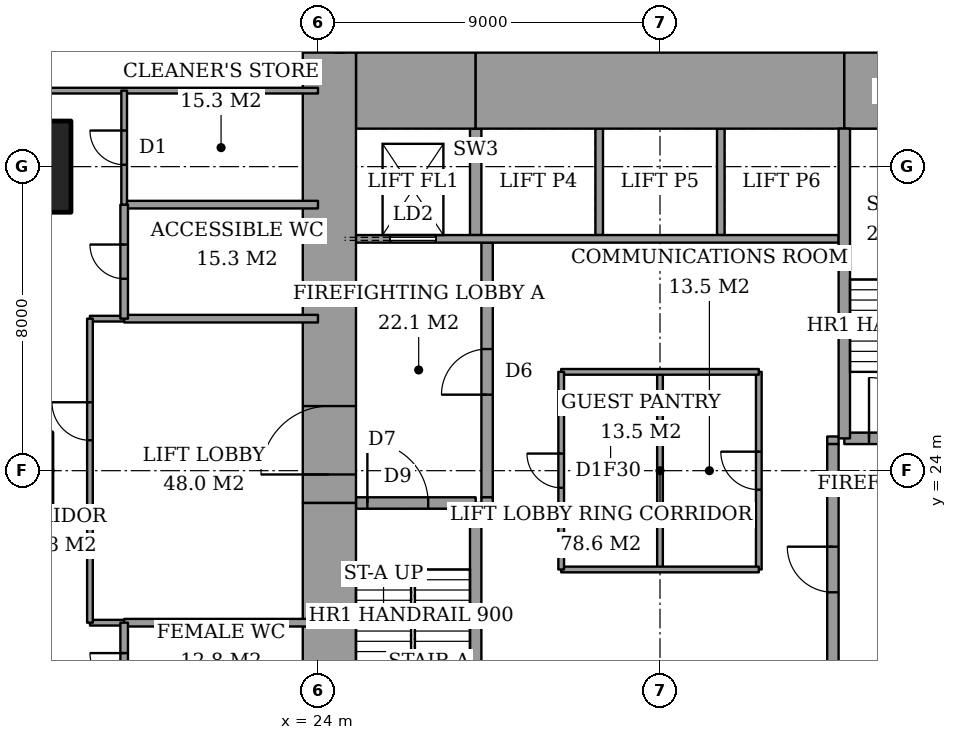
"""IFC4 building model, lengths in metres.
Left out: names, types, materials, properties, quantities, classifications, styles, units other than length and angle.
Written with IfcOpenShell. Run it as: python <this file> out.ifc"""

import sys

from ifc_helpers import new_model, si_unit, direction, frame, frame_2d, origin, origin_2d, place, context, subcontext, project, spatial, rectangle, extrude, element, fill, save


model = new_model("IFC4")
c1 = context("Model", 3, precision=1e-05, world=origin(), true_north=direction((0.0, 1.0)))
c2 = subcontext(c1, "Body", "Model", "MODEL_VIEW")
j1 = project(units=[si_unit("LENGTHUNIT", "METRE"), si_unit("PLANEANGLEUNIT", "RADIAN")], contexts=[c1])
p1 = place(None, origin())
s1 = spatial("IfcSite", under=j1, at=p1, CompositionType="ELEMENT")
p2 = place(p1, origin())
s2 = spatial("IfcBuilding", under=s1, at=p2, CompositionType="ELEMENT")
p3 = place(p2, frame((0.0, 0.0, 26.0)))
s3 = spatial("IfcBuildingStorey", under=s2, at=p3, CompositionType="ELEMENT", Elevation=26.0)
p4 = place(p3, frame((16.0, 32.0, 0.0), z_axis=(0.0, 0.0, 1.0), x_axis=(1.0, 0.0, 0.0)))
e1 = element("IfcColumn", 1, at=p4, inside=s3, PredefinedType="COLUMN", context=c2, shape_type="SweptSolid", body=[
    extrude(rectangle(XDim=3.0, YDim=2.4, at=origin_2d()), origin(), (0.0, 0.0, 1.0), 3.6),
])
p5 = place(p3, frame((25.0, 34.0, 0.0), z_axis=(0.0, 0.0, 1.0), x_axis=(1.0, 0.0, 0.0)))
e2 = element("IfcWall", 2, at=p5, inside=s3, PredefinedType="SHEAR", context=c2, shape_type="SweptSolid", body=[
    extrude(rectangle(XDim=3.15, YDim=2.0, at=frame_2d((1.575, 0.0))), origin(), (0.0, 0.0, 1.0), 3.6),
])
p6 = place(p3, frame((28.15, 34.0, 0.0), z_axis=(0.0, 0.0, 1.0), x_axis=(1.0, 0.0, 0.0)))
e3 = element("IfcWall", 3, at=p6, inside=s3, PredefinedType="SHEAR", context=c2, shape_type="SweptSolid", body=[
    extrude(rectangle(XDim=9.7, YDim=2.0, at=frame_2d((4.85, 0.0))), origin(), (0.0, 0.0, 1.0), 3.6),
])
p7 = place(p3, frame((37.85, 34.0, 0.0), z_axis=(0.0, 0.0, 1.0), x_axis=(1.0, 0.0, 0.0)))
e4 = element("IfcWall", 4, at=p7, inside=s3, PredefinedType="SHEAR", context=c2, shape_type="SweptSolid", body=[
    extrude(rectangle(XDim=3.15, YDim=2.0, at=frame_2d((1.575, 0.0))), origin(), (0.0, 0.0, 1.0), 3.6),
])
p8 = place(p3, frame((24.3, 13.0, 0.0), z_axis=(0.0, 0.0, 1.0), x_axis=(0.0, 1.0, 0.0)))
e5 = element("IfcWall", 5, at=p8, inside=s3, PredefinedType="SHEAR", context=c2, shape_type="SweptSolid", body=[
    extrude(rectangle(XDim=10.15, YDim=1.4, at=frame_2d((5.075, 0.0))), origin(), (0.0, 0.0, 1.0), 3.6),
])
p9 = place(p3, frame((24.3, 23.15, 0.0), z_axis=(0.0, 0.0, 1.0), x_axis=(0.0, 1.0, 0.0)))
e6 = element("IfcWall", 6, at=p9, inside=s3, PredefinedType="SHEAR", context=c2, shape_type="SweptSolid", body=[
    extrude(rectangle(XDim=11.85, YDim=1.4, at=frame_2d((5.925, 0.0))), origin(), (0.0, 0.0, 1.0), 3.6),
])
p10 = place(p9, frame((0.75, 0.0, 0.0)))
e7 = element("IfcOpeningElement", 7, at=p10, cuts=e6, PredefinedType="OPENING", context=c2, shape_type="SweptSolid", body=[
    extrude(rectangle(XDim=1.8, YDim=2.4, at=frame_2d((0.9, 1.2))), frame((0.0, 0.71, 0.0), z_axis=(0.0, -1.0, 0.0), x_axis=(1.0, 0.0, 0.0)), (0.0, 0.0, 1.0), 1.42),
])
p11 = place(p3, frame((28.15, 15.0, 0.0), z_axis=(0.0, 0.0, 1.0), x_axis=(0.0, 1.0, 0.0)))
e8 = element("IfcWall", 8, at=p11, inside=s3, PredefinedType="SHEAR", context=c2, shape_type="SweptSolid", body=[
    extrude(rectangle(XDim=8.15, YDim=0.3, at=frame_2d((4.075, 0.0))), origin(), (0.0, 0.0, 1.0), 3.6),
])
p12 = place(p3, frame((25.0, 23.15, 0.0), z_axis=(0.0, 0.0, 1.0), x_axis=(1.0, 0.0, 0.0)))
e9 = element("IfcWall", 9, at=p12, inside=s3, PredefinedType="SHEAR", context=c2, shape_type="SweptSolid", body=[
    extrude(rectangle(XDim=3.15, YDim=0.3, at=frame_2d((1.575, 0.0))), origin(), (0.0, 0.0, 1.0), 3.6),
])
p13 = place(p12, frame((0.3, 0.0, 0.0)))
e10 = element("IfcOpeningElement", 10, at=p13, cuts=e9, PredefinedType="OPENING", context=c2, shape_type="SweptSolid", body=[
    extrude(rectangle(XDim=1.6, YDim=2.1, at=frame_2d((0.8, 1.05))), frame((0.0, 0.16, 0.0), z_axis=(0.0, -1.0, 0.0), x_axis=(1.0, 0.0, 0.0)), (0.0, 0.0, 1.0), 0.32),
])
p14 = place(p3, frame((37.85, 24.85, 0.0), z_axis=(0.0, 0.0, 1.0), x_axis=(0.0, 1.0, 0.0)))
e11 = element("IfcWall", 11, at=p14, inside=s3, PredefinedType="SHEAR", context=c2, shape_type="SweptSolid", body=[
    extrude(rectangle(XDim=8.15, YDim=0.3, at=frame_2d((4.075, 0.0))), origin(), (0.0, 0.0, 1.0), 3.6),
])
p15 = place(p3, frame((37.85, 24.85, 0.0), z_axis=(0.0, 0.0, 1.0), x_axis=(1.0, 0.0, 0.0)))
e12 = element("IfcWall", 12, at=p15, inside=s3, PredefinedType="SHEAR", context=c2, shape_type="SweptSolid", body=[
    extrude(rectangle(XDim=3.15, YDim=0.3, at=frame_2d((1.575, 0.0))), origin(), (0.0, 0.0, 1.0), 3.6),
])
p16 = place(p15, frame((0.65, 0.0, 0.0)))
e13 = element("IfcOpeningElement", 13, at=p16, cuts=e12, PredefinedType="OPENING", context=c2, shape_type="SweptSolid", body=[
    extrude(rectangle(XDim=1.6, YDim=2.1, at=frame_2d((0.8, 1.05))), frame((0.0, 0.16, 0.0), z_axis=(0.0, -1.0, 0.0), x_axis=(1.0, 0.0, 0.0)), (0.0, 0.0, 1.0), 0.32),
])
p17 = place(p3, frame((28.45, 23.3, 0.0), z_axis=(0.0, 0.0, 1.0), x_axis=(0.0, 1.0, 0.0)))
e14 = element("IfcWall", 14, at=p17, inside=s3, PredefinedType="PARTITIONING", context=c2, shape_type="SweptSolid", body=[
    extrude(rectangle(XDim=6.7, YDim=0.3, at=frame_2d((3.35, 0.0))), origin(), (0.0, 0.0, 1.0), 3.6),
])
p18 = place(p17, frame((2.7, 0.0, 0.0)))
e15 = element("IfcOpeningElement", 15, at=p18, cuts=e14, PredefinedType="OPENING", context=c2, shape_type="SweptSolid", body=[
    extrude(rectangle(XDim=1.2, YDim=2.1, at=frame_2d((0.6, 1.05))), frame((0.0, 0.16, 0.0), z_axis=(0.0, -1.0, 0.0), x_axis=(1.0, 0.0, 0.0)), (0.0, 0.0, 1.0), 0.32),
])
p19 = place(p3, frame((37.55, 18.0, 0.0), z_axis=(0.0, 0.0, 1.0), x_axis=(0.0, 1.0, 0.0)))
e16 = element("IfcWall", 16, at=p19, inside=s3, PredefinedType="PARTITIONING", context=c2, shape_type="SweptSolid", body=[
    extrude(rectangle(XDim=6.7, YDim=0.3, at=frame_2d((3.35, 0.0))), origin(), (0.0, 0.0, 1.0), 3.6),
])
p20 = place(p19, frame((2.8, 0.0, 0.0)))
e17 = element("IfcOpeningElement", 17, at=p20, cuts=e16, PredefinedType="OPENING", context=c2, shape_type="SweptSolid", body=[
    extrude(rectangle(XDim=1.2, YDim=2.1, at=frame_2d((0.6, 1.05))), frame((0.0, 0.16, 0.0), z_axis=(0.0, -1.0, 0.0), x_axis=(1.0, 0.0, 0.0)), (0.0, 0.0, 1.0), 0.32),
])
p21 = place(p3, frame((18.9, 20.0, 0.0), z_axis=(0.0, 0.0, 1.0), x_axis=(1.0, 0.0, 0.0)))
e18 = element("IfcWall", 18, at=p21, inside=s3, PredefinedType="PARTITIONING", context=c2, shape_type="SweptSolid", body=[
    extrude(rectangle(XDim=5.1, YDim=0.2, at=frame_2d((2.55, 0.0))), origin(), (0.0, 0.0, 1.0), 3.35),
])
p22 = place(p3, frame((18.0, 20.0, 0.0), z_axis=(0.0, 0.0, 1.0), x_axis=(1.0, 0.0, 0.0)))
e19 = element("IfcWall", 19, at=p22, inside=s3, PredefinedType="PARTITIONING", context=c2, shape_type="SweptSolid", body=[
    extrude(rectangle(XDim=0.9, YDim=0.15, at=frame_2d((0.45, 0.0))), origin(), (0.0, 0.0, 1.0), 3.35),
])
p23 = place(p3, frame((18.9, 28.0, 0.0), z_axis=(0.0, 0.0, 1.0), x_axis=(1.0, 0.0, 0.0)))
e20 = element("IfcWall", 20, at=p23, inside=s3, PredefinedType="PARTITIONING", context=c2, shape_type="SweptSolid", body=[
    extrude(rectangle(XDim=5.1, YDim=0.2, at=frame_2d((2.55, 0.0))), origin(), (0.0, 0.0, 1.0), 3.35),
])
p24 = place(p3, frame((18.0, 28.0, 0.0), z_axis=(0.0, 0.0, 1.0), x_axis=(1.0, 0.0, 0.0)))
e21 = element("IfcWall", 21, at=p24, inside=s3, PredefinedType="PARTITIONING", context=c2, shape_type="SweptSolid", body=[
    extrude(rectangle(XDim=0.9, YDim=0.15, at=frame_2d((0.45, 0.0))), origin(), (0.0, 0.0, 1.0), 3.35),
])
p25 = place(p3, frame((18.9, 31.0, 0.0), z_axis=(0.0, 0.0, 1.0), x_axis=(1.0, 0.0, 0.0)))
e22 = element("IfcWall", 22, at=p25, inside=s3, PredefinedType="PARTITIONING", context=c2, shape_type="SweptSolid", body=[
    extrude(rectangle(XDim=5.1, YDim=0.2, at=frame_2d((2.55, 0.0))), origin(), (0.0, 0.0, 1.0), 3.35),
])
p26 = place(p3, frame((12.0, 34.0, 0.0), z_axis=(0.0, 0.0, 1.0), x_axis=(1.0, 0.0, 0.0)))
e23 = element("IfcWall", 23, at=p26, inside=s3, PredefinedType="PARTITIONING", context=c2, shape_type="SweptSolid", body=[
    extrude(rectangle(XDim=12.0, YDim=0.15, at=frame_2d((6.0, 0.0))), origin(), (0.0, 0.0, 1.0), 3.35),
])
p27 = place(p26, frame((0.65, 0.0, 0.0)))
e24 = element("IfcOpeningElement", 24, at=p27, cuts=e23, PredefinedType="OPENING", context=c2, shape_type="SweptSolid", body=[
    extrude(rectangle(XDim=1.8, YDim=2.1, at=frame_2d((0.9, 1.05))), frame((0.0, 0.085, 0.0), z_axis=(0.0, -1.0, 0.0), x_axis=(1.0, 0.0, 0.0)), (0.0, 0.0, 1.0), 0.17),
])
p28 = place(p3, frame((18.0, 20.0, 0.0), z_axis=(0.0, 0.0, 1.0), x_axis=(0.0, 1.0, 0.0)))
e25 = element("IfcWall", 25, at=p28, inside=s3, PredefinedType="PARTITIONING", context=c2, shape_type="SweptSolid", body=[
    extrude(rectangle(XDim=8.0, YDim=0.15, at=frame_2d((4.0, 0.0))), origin(), (0.0, 0.0, 1.0), 3.35),
])
p29 = place(p28, frame((4.8, 0.0, 0.0)))
e26 = element("IfcOpeningElement", 26, at=p29, cuts=e25, PredefinedType="OPENING", context=c2, shape_type="SweptSolid", body=[
    extrude(rectangle(XDim=1.0, YDim=2.1, at=frame_2d((0.5, 1.05))), frame((0.0, 0.085, 0.0), z_axis=(0.0, -1.0, 0.0), x_axis=(1.0, 0.0, 0.0)), (0.0, 0.0, 1.0), 0.17),
])
p30 = place(p3, frame((18.9, 14.0, 0.0), z_axis=(0.0, 0.0, 1.0), x_axis=(0.0, 1.0, 0.0)))
e27 = element("IfcWall", 27, at=p30, inside=s3, PredefinedType="PARTITIONING", context=c2, shape_type="SweptSolid", body=[
    extrude(rectangle(XDim=6.0, YDim=0.2, at=frame_2d((3.0, 0.0))), origin(), (0.0, 0.0, 1.0), 3.35),
])
p31 = place(p30, frame((1.3, 0.0, 0.0)))
e28 = element("IfcOpeningElement", 28, at=p31, cuts=e27, PredefinedType="OPENING", context=c2, shape_type="SweptSolid", body=[
    extrude(rectangle(XDim=0.9, YDim=2.1, at=frame_2d((0.45, 1.05))), frame((0.0, 0.11, 0.0), z_axis=(0.0, -1.0, 0.0), x_axis=(1.0, 0.0, 0.0)), (0.0, 0.0, 1.0), 0.22),
])
p32 = place(p30, frame((4.3, 0.0, 0.0)))
e29 = element("IfcOpeningElement", 29, at=p32, cuts=e27, PredefinedType="OPENING", context=c2, shape_type="SweptSolid", body=[
    extrude(rectangle(XDim=0.9, YDim=2.1, at=frame_2d((0.45, 1.05))), frame((0.0, 0.11, 0.0), z_axis=(0.0, -1.0, 0.0), x_axis=(1.0, 0.0, 0.0)), (0.0, 0.0, 1.0), 0.22),
])
p33 = place(p3, frame((18.9, 28.0, 0.0), z_axis=(0.0, 0.0, 1.0), x_axis=(0.0, 1.0, 0.0)))
e30 = element("IfcWall", 30, at=p33, inside=s3, PredefinedType="PARTITIONING", context=c2, shape_type="SweptSolid", body=[
    extrude(rectangle(XDim=3.0, YDim=0.2, at=frame_2d((1.5, 0.0))), origin(), (0.0, 0.0, 1.0), 3.35),
])
p34 = place(p33, frame((1.05, 0.0, 0.0)))
e31 = element("IfcOpeningElement", 31, at=p34, cuts=e30, PredefinedType="OPENING", context=c2, shape_type="SweptSolid", body=[
    extrude(rectangle(XDim=0.9, YDim=2.1, at=frame_2d((0.45, 1.05))), frame((0.0, 0.11, 0.0), z_axis=(0.0, -1.0, 0.0), x_axis=(1.0, 0.0, 0.0)), (0.0, 0.0, 1.0), 0.22),
])
p35 = place(p3, frame((18.9, 31.0, 0.0), z_axis=(0.0, 0.0, 1.0), x_axis=(0.0, 1.0, 0.0)))
e32 = element("IfcWall", 32, at=p35, inside=s3, PredefinedType="PARTITIONING", context=c2, shape_type="SweptSolid", body=[
    extrude(rectangle(XDim=3.0, YDim=0.15, at=frame_2d((1.5, 0.0))), origin(), (0.0, 0.0, 1.0), 3.35),
])
p36 = place(p35, frame((1.05, 0.0, 0.0)))
e33 = element("IfcOpeningElement", 33, at=p36, cuts=e32, PredefinedType="OPENING", context=c2, shape_type="SweptSolid", body=[
    extrude(rectangle(XDim=0.9, YDim=2.1, at=frame_2d((0.45, 1.05))), frame((0.0, 0.085, 0.0), z_axis=(0.0, -1.0, 0.0), x_axis=(1.0, 0.0, 0.0)), (0.0, 0.0, 1.0), 0.17),
])
p37 = place(p3, frame((25.0, 30.1, 0.0), z_axis=(0.0, 0.0, 1.0), x_axis=(1.0, 0.0, 0.0)))
e34 = element("IfcWall", 34, at=p37, inside=s3, PredefinedType="PARTITIONING", context=c2, shape_type="SweptSolid", body=[
    extrude(rectangle(XDim=12.7, YDim=0.2, at=frame_2d((6.35, 0.0))), origin(), (0.0, 0.0, 1.0), 3.6),
])
p38 = place(p37, frame((0.9, 0.0, 0.0)))
e35 = element("IfcOpeningElement", 35, at=p38, cuts=e34, PredefinedType="OPENING", context=c2, shape_type="SweptSolid", body=[
    extrude(rectangle(XDim=1.2, YDim=2.1, at=frame_2d((0.6, 1.05))), frame((0.0, 0.11, 0.0), z_axis=(0.0, -1.0, 0.0), x_axis=(1.0, 0.0, 0.0)), (0.0, 0.0, 1.0), 0.22),
])
for number, where, z_axis, x_axis in (
    (36, (31.4, 30.2, 0.0), (0.0, 0.0, 1.0), (0.0, 1.0, 0.0)),
    (37, (34.6, 30.2, 0.0), (0.0, 0.0, 1.0), (0.0, 1.0, 0.0)),
):
    element("IfcWall", number, at=place(p3, frame(where, z_axis=z_axis, x_axis=x_axis)), inside=s3, PredefinedType="PARTITIONING", context=c2, shape_type="SweptSolid", body=[
        extrude(rectangle(XDim=2.8, YDim=0.2, at=frame_2d((1.4, 0.0))), origin(), (0.0, 0.0, 1.0), 3.6),
    ])
p39 = place(p3, frame((28.15, 30.2, 0.0), z_axis=(0.0, 0.0, 1.0), x_axis=(0.0, 1.0, 0.0)))
e38 = element("IfcWall", 38, at=p39, inside=s3, PredefinedType="SHEAR", context=c2, shape_type="SweptSolid", body=[
    extrude(rectangle(XDim=2.8, YDim=0.3, at=frame_2d((1.4, 0.0))), origin(), (0.0, 0.0, 1.0), 3.6),
])
for number, where, z_axis, x_axis in (
    (39, (28.3, 23.2, 0.0), (0.0, 0.0, 1.0), (1.0, 0.0, 0.0)),
    (40, (37.4, 24.8, 0.0), (0.0, 0.0, 1.0), (1.0, 0.0, 0.0)),
):
    element("IfcWall", number, at=place(p3, frame(where, z_axis=z_axis, x_axis=x_axis)), inside=s3, PredefinedType="PARTITIONING", context=c2, shape_type="SweptSolid", body=[
        extrude(rectangle(XDim=0.3, YDim=0.2, at=frame_2d((0.15, 0.0))), origin(), (0.0, 0.0, 1.0), 3.6),
    ])
for number, where, z_axis, x_axis in (
    (41, (30.4, 21.4, 0.0), (0.0, 0.0, 1.0), (1.0, 0.0, 0.0)),
    (42, (30.4, 26.6, 0.0), (0.0, 0.0, 1.0), (1.0, 0.0, 0.0)),
):
    element("IfcWall", number, at=place(p3, frame(where, z_axis=z_axis, x_axis=x_axis)), inside=s3, PredefinedType="PARTITIONING", context=c2, shape_type="SweptSolid", body=[
        extrude(rectangle(XDim=5.2, YDim=0.15, at=frame_2d((2.6, 0.0))), origin(), (0.0, 0.0, 1.0), 3.35),
    ])
p40 = place(p3, frame((30.4, 21.4, 0.0), z_axis=(0.0, 0.0, 1.0), x_axis=(0.0, 1.0, 0.0)))
e43 = element("IfcWall", 43, at=p40, inside=s3, PredefinedType="PARTITIONING", context=c2, shape_type="SweptSolid", body=[
    extrude(rectangle(XDim=5.2, YDim=0.15, at=frame_2d((2.6, 0.0))), origin(), (0.0, 0.0, 1.0), 3.35),
])
p41 = place(p40, frame((2.15, 0.0, 0.0)))
e44 = element("IfcOpeningElement", 44, at=p41, cuts=e43, PredefinedType="OPENING", context=c2, shape_type="SweptSolid", body=[
    extrude(rectangle(XDim=0.9, YDim=2.1, at=frame_2d((0.45, 1.05))), frame((0.0, 0.085, 0.0), z_axis=(0.0, -1.0, 0.0), x_axis=(1.0, 0.0, 0.0)), (0.0, 0.0, 1.0), 0.17),
])
p42 = place(p3, frame((35.6, 21.4, 0.0), z_axis=(0.0, 0.0, 1.0), x_axis=(0.0, 1.0, 0.0)))
e45 = element("IfcWall", 45, at=p42, inside=s3, PredefinedType="PARTITIONING", context=c2, shape_type="SweptSolid", body=[
    extrude(rectangle(XDim=5.2, YDim=0.15, at=frame_2d((2.6, 0.0))), origin(), (0.0, 0.0, 1.0), 3.35),
])
p43 = place(p42, frame((2.1, 0.0, 0.0)))
e46 = element("IfcOpeningElement", 46, at=p43, cuts=e45, PredefinedType="OPENING", context=c2, shape_type="SweptSolid", body=[
    extrude(rectangle(XDim=1.0, YDim=2.1, at=frame_2d((0.5, 1.05))), frame((0.0, 0.085, 0.0), z_axis=(0.0, -1.0, 0.0), x_axis=(1.0, 0.0, 0.0)), (0.0, 0.0, 1.0), 0.17),
])
p44 = place(p3, frame((33.0, 21.4, 0.0), z_axis=(0.0, 0.0, 1.0), x_axis=(0.0, 1.0, 0.0)))
e47 = element("IfcWall", 47, at=p44, inside=s3, PredefinedType="PARTITIONING", context=c2, shape_type="SweptSolid", body=[
    extrude(rectangle(XDim=5.2, YDim=0.15, at=frame_2d((2.6, 0.0))), origin(), (0.0, 0.0, 1.0), 3.35),
])
p45 = place(p29, origin())
e48 = element("IfcDoor", 48, at=p45, inside=s3, OperationType="SINGLE_SWING_LEFT", PredefinedType="DOOR", context=c2, shape_type="SweptSolid", body=[
    extrude(rectangle(XDim=1.0, YDim=2.1, at=frame_2d((0.5, 1.05))), frame((0.0, 0.025, 0.0), z_axis=(0.0, -1.0, 0.0), x_axis=(1.0, 0.0, 0.0)), (0.0, 0.0, 1.0), 0.05),
])
fill(e26, e48)
p46 = place(p32, origin())
e49 = element("IfcDoor", 49, at=p46, inside=s3, OperationType="SINGLE_SWING_LEFT", PredefinedType="DOOR", context=c2, shape_type="SweptSolid", body=[
    extrude(rectangle(XDim=0.9, YDim=2.1, at=frame_2d((0.45, 1.05))), frame((0.0, 0.025, 0.0), z_axis=(0.0, -1.0, 0.0), x_axis=(1.0, 0.0, 0.0)), (0.0, 0.0, 1.0), 0.05),
])
fill(e29, e49)
p47 = place(p34, origin())
e50 = element("IfcDoor", 50, at=p47, inside=s3, OperationType="SINGLE_SWING_LEFT", PredefinedType="DOOR", context=c2, shape_type="SweptSolid", body=[
    extrude(rectangle(XDim=0.9, YDim=2.1, at=frame_2d((0.45, 1.05))), frame((0.0, 0.025, 0.0), z_axis=(0.0, -1.0, 0.0), x_axis=(1.0, 0.0, 0.0)), (0.0, 0.0, 1.0), 0.05),
])
fill(e31, e50)
p48 = place(p36, origin())
e51 = element("IfcDoor", 51, at=p48, inside=s3, OperationType="SINGLE_SWING_LEFT", PredefinedType="DOOR", context=c2, shape_type="SweptSolid", body=[
    extrude(rectangle(XDim=0.9, YDim=2.1, at=frame_2d((0.45, 1.05))), frame((0.0, 0.025, 0.0), z_axis=(0.0, -1.0, 0.0), x_axis=(1.0, 0.0, 0.0)), (0.0, 0.0, 1.0), 0.05),
])
fill(e33, e51)
p49 = place(p13, origin())
e52 = element("IfcDoor", 52, at=p49, inside=s3, OperationType="DOUBLE_DOOR_SINGLE_SWING", PredefinedType="DOOR", context=c2, shape_type="SweptSolid", body=[
    extrude(rectangle(XDim=1.6, YDim=2.1, at=frame_2d((0.8, 1.05))), frame((0.0, 0.025, 0.0), z_axis=(0.0, -1.0, 0.0), x_axis=(1.0, 0.0, 0.0)), (0.0, 0.0, 1.0), 0.05),
])
fill(e10, e52)
p50 = place(p16, origin())
e53 = element("IfcDoor", 53, at=p50, inside=s3, OperationType="DOUBLE_DOOR_SINGLE_SWING", PredefinedType="DOOR", context=c2, shape_type="SweptSolid", body=[
    extrude(rectangle(XDim=1.6, YDim=2.1, at=frame_2d((0.8, 1.05))), frame((0.0, 0.025, 0.0), z_axis=(0.0, -1.0, 0.0), x_axis=(1.0, 0.0, 0.0)), (0.0, 0.0, 1.0), 0.05),
])
fill(e13, e53)
p51 = place(p18, origin())
e54 = element("IfcDoor", 54, at=p51, inside=s3, OperationType="SINGLE_SWING_RIGHT", PredefinedType="DOOR", context=c2, shape_type="SweptSolid", body=[
    extrude(rectangle(XDim=1.2, YDim=2.1, at=frame_2d((0.6, 1.05))), frame((0.0, 0.025, 0.0), z_axis=(0.0, -1.0, 0.0), x_axis=(1.0, 0.0, 0.0)), (0.0, 0.0, 1.0), 0.05),
])
fill(e15, e54)
p52 = place(p20, origin())
e55 = element("IfcDoor", 55, at=p52, inside=s3, OperationType="SINGLE_SWING_LEFT", PredefinedType="DOOR", context=c2, shape_type="SweptSolid", body=[
    extrude(rectangle(XDim=1.2, YDim=2.1, at=frame_2d((0.6, 1.05))), frame((0.0, 0.025, 0.0), z_axis=(0.0, -1.0, 0.0), x_axis=(1.0, 0.0, 0.0)), (0.0, 0.0, 1.0), 0.05),
])
fill(e17, e55)
p53 = place(p10, origin())
e56 = element("IfcDoor", 56, at=p53, inside=s3, OperationType="DOUBLE_DOOR_DOUBLE_SWING", PredefinedType="DOOR", context=c2, shape_type="SweptSolid", body=[
    extrude(rectangle(XDim=1.8, YDim=2.4, at=frame_2d((0.9, 1.2))), frame((0.0, 0.025, 0.0), z_axis=(0.0, -1.0, 0.0), x_axis=(1.0, 0.0, 0.0)), (0.0, 0.0, 1.0), 0.05),
])
fill(e7, e56)
p54 = place(p41, origin())
e57 = element("IfcDoor", 57, at=p54, inside=s3, OperationType="SINGLE_SWING_LEFT", PredefinedType="DOOR", context=c2, shape_type="SweptSolid", body=[
    extrude(rectangle(XDim=0.9, YDim=2.1, at=frame_2d((0.45, 1.05))), frame((0.0, 0.025, 0.0), z_axis=(0.0, -1.0, 0.0), x_axis=(1.0, 0.0, 0.0)), (0.0, 0.0, 1.0), 0.05),
])
fill(e44, e57)
p55 = place(p43, origin())
e58 = element("IfcDoor", 58, at=p55, inside=s3, OperationType="SINGLE_SWING_LEFT", PredefinedType="DOOR", context=c2, shape_type="SweptSolid", body=[
    extrude(rectangle(XDim=1.0, YDim=2.1, at=frame_2d((0.5, 1.05))), frame((0.0, 0.025, 0.0), z_axis=(0.0, -1.0, 0.0), x_axis=(1.0, 0.0, 0.0)), (0.0, 0.0, 1.0), 0.05),
])
fill(e46, e58)
p56 = place(p38, origin())
e59 = element("IfcDoor", 59, at=p56, inside=s3, OperationType="SLIDING_TO_LEFT", PredefinedType="DOOR", context=c2, shape_type="SweptSolid", body=[
    extrude(rectangle(XDim=1.2, YDim=2.1, at=frame_2d((0.6, 1.05))), frame((0.0, 0.025, 0.0), z_axis=(0.0, -1.0, 0.0), x_axis=(1.0, 0.0, 0.0)), (0.0, 0.0, 1.0), 0.05),
])
fill(e35, e59)
save(model, sys.argv[1])
